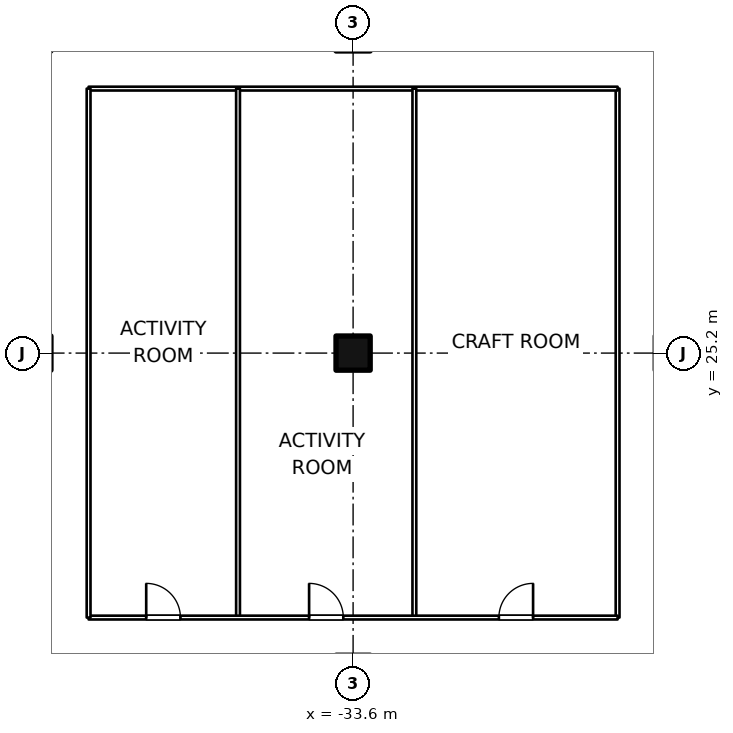
"""IFC4 building model, lengths in metres.
Left out: names, types, materials, properties, quantities, classifications, styles, units other than length and angle.
Written with IfcOpenShell. Run it as: python <this file> out.ifc"""

import sys

from ifc_helpers import new_model, si_unit, direction, frame, frame_2d, origin, origin_2d, place, context, subcontext, project, spatial, rectangle, extrude, element, fill, save


model = new_model("IFC4")
c1 = context("Model", 3, precision=1e-05, world=origin(), true_north=direction((0.0, 1.0)))
c2 = subcontext(c1, "Body", "Model", "MODEL_VIEW")
j1 = project(units=[si_unit("LENGTHUNIT", "METRE"), si_unit("PLANEANGLEUNIT", "RADIAN")], contexts=[c1])
p1 = place(None, origin())
s1 = spatial("IfcSite", under=j1, at=p1, CompositionType="ELEMENT")
p2 = place(p1, origin())
s2 = spatial("IfcBuilding", under=s1, at=p2, CompositionType="ELEMENT")
p3 = place(p2, frame((0.0, 0.0, 6.0)))
s3 = spatial("IfcBuildingStorey", under=s2, at=p3, CompositionType="ELEMENT", Elevation=6.0)
p4 = place(p3, frame((-33.6, 25.2, 0.0), z_axis=(0.0, 0.0, 1.0), x_axis=(1.0, 0.0, 0.0)))
e1 = element("IfcColumn", 1, at=p4, inside=s3, PredefinedType="COLUMN", context=c2, shape_type="SweptSolid", body=[
    extrude(rectangle(XDim=0.9, YDim=0.9, at=origin_2d()), origin(), (0.0, 0.0, 1.0), 5.0),
])
p5 = place(p3, frame((-40.56, 18.24, 0.0), z_axis=(0.0, 0.0, 1.0), x_axis=(1.0, 0.0, 0.0)))
e2 = element("IfcWall", 2, at=p5, inside=s3, PredefinedType="PARTITIONING", context=c2, shape_type="SweptSolid", body=[
    extrude(rectangle(XDim=13.92, YDim=0.1, at=frame_2d((6.96, 0.0))), origin(), (0.0, 0.0, 1.0), 4.7),
])
p6 = place(p5, frame((1.516, 0.0, 0.0)))
e3 = element("IfcOpeningElement", 3, at=p6, cuts=e2, PredefinedType="OPENING", context=c2, shape_type="SweptSolid", body=[
    extrude(rectangle(XDim=0.9, YDim=2.1, at=frame_2d((0.45, 1.05))), frame((0.0, 0.06, 0.0), z_axis=(0.0, -1.0, 0.0), x_axis=(1.0, 0.0, 0.0)), (0.0, 0.0, 1.0), 0.12),
])
p7 = place(p5, frame((5.802, 0.0, 0.0)))
e4 = element("IfcOpeningElement", 4, at=p7, cuts=e2, PredefinedType="OPENING", context=c2, shape_type="SweptSolid", body=[
    extrude(rectangle(XDim=0.9, YDim=2.1, at=frame_2d((0.45, 1.05))), frame((0.0, 0.06, 0.0), z_axis=(0.0, -1.0, 0.0), x_axis=(1.0, 0.0, 0.0)), (0.0, 0.0, 1.0), 0.12),
])
p8 = place(p5, frame((10.796, 0.0, 0.0)))
e5 = element("IfcOpeningElement", 5, at=p8, cuts=e2, PredefinedType="OPENING", context=c2, shape_type="SweptSolid", body=[
    extrude(rectangle(XDim=0.9, YDim=2.1, at=frame_2d((0.45, 1.05))), frame((0.0, 0.06, 0.0), z_axis=(0.0, -1.0, 0.0), x_axis=(1.0, 0.0, 0.0)), (0.0, 0.0, 1.0), 0.12),
])
p9 = place(p3, frame((-26.64, 18.24, 0.0), z_axis=(0.0, 0.0, 1.0), x_axis=(0.0, 1.0, 0.0)))
e6 = element("IfcWall", 6, at=p9, inside=s3, PredefinedType="PARTITIONING", context=c2, shape_type="SweptSolid", body=[
    extrude(rectangle(XDim=13.92, YDim=0.1, at=frame_2d((6.96, 0.0))), origin(), (0.0, 0.0, 1.0), 4.7),
])
p10 = place(p3, frame((-26.64, 32.16, 0.0), z_axis=(0.0, 0.0, 1.0), x_axis=(-1.0, 0.0, 0.0)))
e7 = element("IfcWall", 7, at=p10, inside=s3, PredefinedType="PARTITIONING", context=c2, shape_type="SweptSolid", body=[
    extrude(rectangle(XDim=13.92, YDim=0.1, at=frame_2d((6.96, 0.0))), origin(), (0.0, 0.0, 1.0), 4.7),
])
for number, where, z_axis, x_axis in (
    (8, (-40.56, 32.16, 0.0), (0.0, 0.0, 1.0), (0.0, -1.0, 0.0)),
    (9, (-36.628, 18.24, 0.0), (0.0, 0.0, 1.0), (0.0, 1.0, 0.0)),
    (10, (-31.988, 18.24, 0.0), (0.0, 0.0, 1.0), (0.0, 1.0, 0.0)),
):
    element("IfcWall", number, at=place(p3, frame(where, z_axis=z_axis, x_axis=x_axis)), inside=s3, PredefinedType="PARTITIONING", context=c2, shape_type="SweptSolid", body=[
        extrude(rectangle(XDim=13.92, YDim=0.1, at=frame_2d((6.96, 0.0))), origin(), (0.0, 0.0, 1.0), 4.7),
    ])
p11 = place(p6, origin())
e11 = element("IfcDoor", 11, at=p11, inside=s3, OperationType="SINGLE_SWING_LEFT", PredefinedType="DOOR", context=c2, shape_type="SweptSolid", body=[
    extrude(rectangle(XDim=0.9, YDim=2.1, at=frame_2d((0.45, 1.05))), frame((0.0, 0.025, 0.0), z_axis=(0.0, -1.0, 0.0), x_axis=(1.0, 0.0, 0.0)), (0.0, 0.0, 1.0), 0.05),
])
fill(e3, e11)
p12 = place(p7, origin())
e12 = element("IfcDoor", 12, at=p12, inside=s3, OperationType="SINGLE_SWING_LEFT", PredefinedType="DOOR", context=c2, shape_type="SweptSolid", body=[
    extrude(rectangle(XDim=0.9, YDim=2.1, at=frame_2d((0.45, 1.05))), frame((0.0, 0.025, 0.0), z_axis=(0.0, -1.0, 0.0), x_axis=(1.0, 0.0, 0.0)), (0.0, 0.0, 1.0), 0.05),
])
fill(e4, e12)
p13 = place(p8, origin())
e13 = element("IfcDoor", 13, at=p13, inside=s3, OperationType="SINGLE_SWING_RIGHT", PredefinedType="DOOR", context=c2, shape_type="SweptSolid", body=[
    extrude(rectangle(XDim=0.9, YDim=2.1, at=frame_2d((0.45, 1.05))), frame((0.0, 0.025, 0.0), z_axis=(0.0, -1.0, 0.0), x_axis=(1.0, 0.0, 0.0)), (0.0, 0.0, 1.0), 0.05),
])
fill(e5, e13)
save(model, sys.argv[1])
